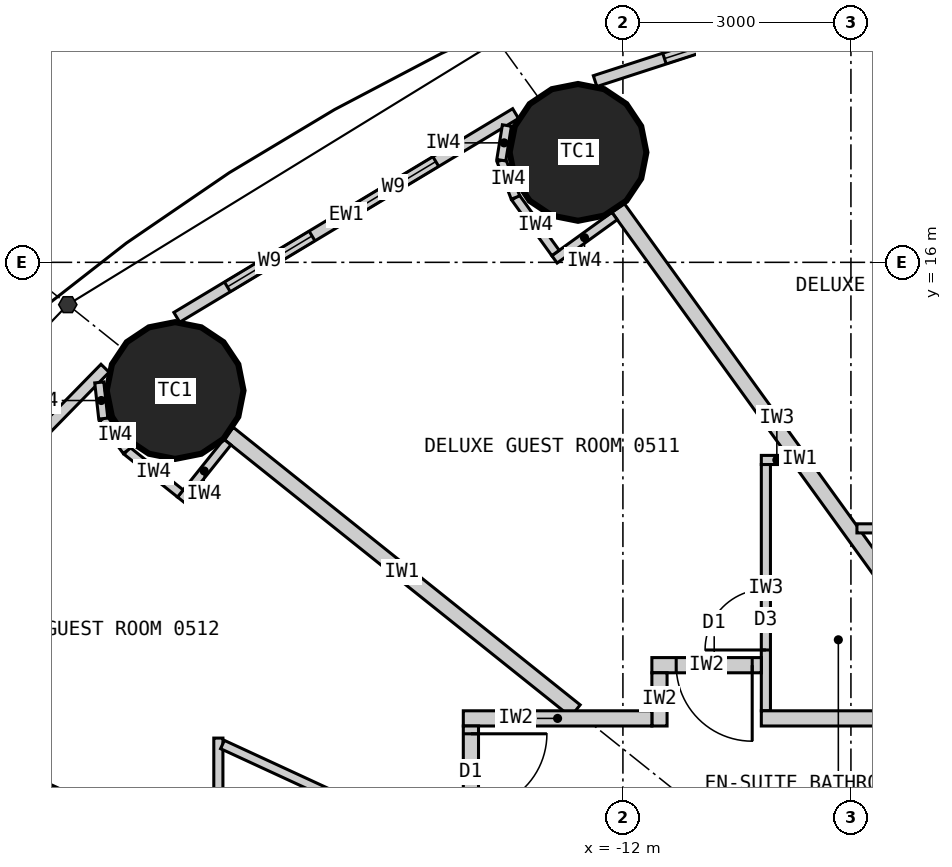
"""IFC4 building model, lengths in metres.
Left out: names, types, materials, properties, quantities, classifications, styles, units other than length and angle.
Written with IfcOpenShell. Run it as: python <this file> out.ifc"""

import sys

from ifc_helpers import new_model, si_unit, direction, frame, frame_2d, origin, origin_2d, place, context, subcontext, project, spatial, rectangle, circle, extrude, element, fill, save


model = new_model("IFC4")
c1 = context("Model", 3, precision=1e-05, world=origin(), true_north=direction((0.0, 1.0)))
c2 = subcontext(c1, "Body", "Model", "MODEL_VIEW")
j1 = project(units=[si_unit("LENGTHUNIT", "METRE"), si_unit("PLANEANGLEUNIT", "RADIAN")], contexts=[c1])
p1 = place(None, origin())
s1 = spatial("IfcSite", under=j1, at=p1, CompositionType="ELEMENT")
p2 = place(p1, origin())
s2 = spatial("IfcBuilding", under=s1, at=p2, CompositionType="ELEMENT")
p3 = place(p2, frame((0.0, 0.0, 29.4)))
s3 = spatial("IfcBuildingStorey", under=s2, at=p3, CompositionType="ELEMENT", Elevation=29.4)
for number, where, z_axis, x_axis in (
    (1, (-12.591, 17.447, 0.0), (0.0, 0.0, 1.0), (1.0, 0.0, 0.0)),
    (2, (-17.892, 14.313, 0.0), (0.0, 0.0, 1.0), (1.0, 0.0, 0.0)),
):
    element("IfcColumn", number, at=place(p3, frame(where, z_axis=z_axis, x_axis=x_axis)), inside=s3, PredefinedType="COLUMN", context=c2, shape_type="SweptSolid", body=[
        extrude(circle(Radius=0.9, at=origin_2d()), origin(), (0.0, 0.0, 1.0), 3.3),
    ])
p4 = place(p3, frame((-7.188, 20.065, 0.0), z_axis=(0.0, 0.0, 1.0), x_axis=(-0.951138486029, -0.308764603532, 0.0)))
e3 = element("IfcWall", 3, at=p4, inside=s3, PredefinedType="ELEMENTEDWALL", context=c2, shape_type="SweptSolid", body=[
    extrude(rectangle(XDim=5.444, YDim=0.15, at=frame_2d((2.722, 0.0))), origin(), (0.0, 0.0, 1.0), 3.12),
])
p5 = place(p4, frame((1.284, 0.0, 0.9)))
e4 = element("IfcOpeningElement", 4, at=p5, cuts=e3, PredefinedType="OPENING", context=c2, shape_type="SweptSolid", body=[
    extrude(rectangle(XDim=1.3, YDim=1.9, at=frame_2d((0.65, 0.95))), frame((0.0, 0.085, 0.0), z_axis=(0.0, -1.0, 0.0), x_axis=(1.0, 0.0, 0.0)), (0.0, 0.0, 1.0), 0.17),
])
p6 = place(p4, frame((3.184, 0.0, 0.9)))
e5 = element("IfcOpeningElement", 5, at=p6, cuts=e3, PredefinedType="OPENING", context=c2, shape_type="SweptSolid", body=[
    extrude(rectangle(XDim=1.3, YDim=1.9, at=frame_2d((0.65, 0.95))), frame((0.0, 0.085, 0.0), z_axis=(0.0, -1.0, 0.0), x_axis=(1.0, 0.0, 0.0)), (0.0, 0.0, 1.0), 0.17),
])
p7 = place(p3, frame((-13.412, 17.957, 0.0), z_axis=(0.0, 0.0, 1.0), x_axis=(-0.856958191554, -0.515385931054, 0.0)))
e6 = element("IfcWall", 6, at=p7, inside=s3, PredefinedType="ELEMENTEDWALL", context=c2, shape_type="SweptSolid", body=[
    extrude(rectangle(XDim=5.201, YDim=0.15, at=frame_2d((2.601, 0.0))), origin(), (0.0, 0.0, 1.0), 3.12),
])
p8 = place(p7, frame((1.225, 0.0, 0.9)))
e7 = element("IfcOpeningElement", 7, at=p8, cuts=e6, PredefinedType="OPENING", context=c2, shape_type="SweptSolid", body=[
    extrude(rectangle(XDim=1.3, YDim=1.9, at=frame_2d((0.65, 0.95))), frame((0.0, 0.085, 0.0), z_axis=(0.0, -1.0, 0.0), x_axis=(1.0, 0.0, 0.0)), (0.0, 0.0, 1.0), 0.17),
])
p9 = place(p7, frame((3.125, 0.0, 0.9)))
e8 = element("IfcOpeningElement", 8, at=p9, cuts=e6, PredefinedType="OPENING", context=c2, shape_type="SweptSolid", body=[
    extrude(rectangle(XDim=1.3, YDim=1.9, at=frame_2d((0.65, 0.95))), frame((0.0, 0.085, 0.0), z_axis=(0.0, -1.0, 0.0), x_axis=(1.0, 0.0, 0.0)), (0.0, 0.0, 1.0), 0.17),
])
p10 = place(p3, frame((-18.813, 14.607, 0.0), z_axis=(0.0, 0.0, 1.0), x_axis=(-0.699612594083, -0.714522370679, 0.0)))
e9 = element("IfcWall", 9, at=p10, inside=s3, PredefinedType="ELEMENTEDWALL", context=c2, shape_type="SweptSolid", body=[
    extrude(rectangle(XDim=4.896, YDim=0.15, at=frame_2d((2.448, 0.0))), origin(), (0.0, 0.0, 1.0), 3.12),
])
p11 = place(p10, frame((1.077, 0.0, 0.9)))
e10 = element("IfcOpeningElement", 10, at=p11, cuts=e9, PredefinedType="OPENING", context=c2, shape_type="SweptSolid", body=[
    extrude(rectangle(XDim=1.3, YDim=1.9, at=frame_2d((0.65, 0.95))), frame((0.0, 0.085, 0.0), z_axis=(0.0, -1.0, 0.0), x_axis=(1.0, 0.0, 0.0)), (0.0, 0.0, 1.0), 0.17),
])
p12 = place(p10, frame((2.977, 0.0, 0.9)))
e11 = element("IfcOpeningElement", 11, at=p12, cuts=e9, PredefinedType="OPENING", context=c2, shape_type="SweptSolid", body=[
    extrude(rectangle(XDim=1.3, YDim=1.9, at=frame_2d((0.65, 0.95))), frame((0.0, 0.085, 0.0), z_axis=(0.0, -1.0, 0.0), x_axis=(1.0, 0.0, 0.0)), (0.0, 0.0, 1.0), 0.17),
])
p13 = place(p3, frame((-7.289, 10.1, 0.0), z_axis=(0.0, 0.0, 1.0), x_axis=(-0.585216319319, 0.810877216108, 0.0)))
e12 = element("IfcWall", 12, at=p13, inside=s3, PredefinedType="PARTITIONING", context=c2, shape_type="SweptSolid", body=[
    extrude(rectangle(XDim=8.16, YDim=0.2, at=frame_2d((4.08, 0.0))), origin(), (0.0, 0.0, 1.0), 2.32),
])
p14 = place(p3, frame((-12.625, 10.1, 0.0), z_axis=(0.0, 0.0, 1.0), x_axis=(-0.780872884676, 0.624689953479, 0.0)))
e13 = element("IfcWall", 13, at=p14, inside=s3, PredefinedType="PARTITIONING", context=c2, shape_type="SweptSolid", body=[
    extrude(rectangle(XDim=5.845, YDim=0.2, at=frame_2d((2.922, 0.0))), origin(), (0.0, 0.0, 1.0), 2.32),
])
p15 = place(p3, frame((-14.1, 6.512, 0.0), z_axis=(0.0, 0.0, 1.0), x_axis=(-0.907842433118, 0.41931147925, 0.0)))
e14 = element("IfcWall", 14, at=p15, inside=s3, PredefinedType="PARTITIONING", context=c2, shape_type="SweptSolid", body=[
    extrude(rectangle(XDim=7.823, YDim=0.2, at=frame_2d((3.912, 0.0))), origin(), (0.0, 0.0, 1.0), 2.32),
])
p16 = place(p3, frame((-8.921, 12.5, 0.0), z_axis=(0.0, 0.0, 1.0), x_axis=(1.0, 0.0, 0.0)))
e15 = element("IfcWall", 15, at=p16, inside=s3, PredefinedType="PARTITIONING", context=c2, shape_type="SweptSolid", body=[
    extrude(rectangle(XDim=3.372, YDim=0.12, at=frame_2d((1.686, 0.0))), origin(), (0.0, 0.0, 1.0), 3.12),
])
p17 = place(p3, frame((-9.771, 13.4, 0.0), z_axis=(0.0, 0.0, 1.0), x_axis=(-1.0, 0.0, 0.0)))
e16 = element("IfcWall", 16, at=p17, inside=s3, PredefinedType="PARTITIONING", context=c2, shape_type="SweptSolid", body=[
    extrude(rectangle(XDim=0.408, YDim=0.12, at=frame_2d((0.204, 0.0))), origin(), (0.0, 0.0, 1.0), 3.12),
])
p18 = place(p3, frame((-10.119, 10.1, 0.0), z_axis=(0.0, 0.0, 1.0), x_axis=(0.0, 1.0, 0.0)))
e17 = element("IfcWall", 17, at=p18, inside=s3, PredefinedType="PARTITIONING", context=c2, shape_type="SweptSolid", body=[
    extrude(rectangle(XDim=3.24, YDim=0.12, at=frame_2d((1.62, 0.0))), origin(), (0.0, 0.0, 1.0), 3.12),
])
p19 = place(p18, frame((0.8, 0.0, 0.0)))
e18 = element("IfcOpeningElement", 18, at=p19, cuts=e17, PredefinedType="OPENING", context=c2, shape_type="SweptSolid", body=[
    extrude(rectangle(XDim=0.8, YDim=2.1, at=frame_2d((0.4, 1.05))), frame((0.0, 0.07, 0.0), z_axis=(0.0, -1.0, 0.0), x_axis=(1.0, 0.0, 0.0)), (0.0, 0.0, 1.0), 0.14),
])
p20 = place(p3, frame((-17.323, 8.101, 0.0), z_axis=(0.0, 0.0, 1.0), x_axis=(0.0, 1.0, 0.0)))
e19 = element("IfcWall", 19, at=p20, inside=s3, PredefinedType="PARTITIONING", context=c2, shape_type="SweptSolid", body=[
    extrude(rectangle(XDim=1.64, YDim=0.12, at=frame_2d((0.82, 0.0))), origin(), (0.0, 0.0, 1.0), 3.12),
])
p21 = place(p3, frame((-14.1, 8.193, 0.0), z_axis=(0.0, 0.0, 1.0), x_axis=(-0.907836493557, 0.419324338628, 0.0)))
e20 = element("IfcWall", 20, at=p21, inside=s3, PredefinedType="PARTITIONING", context=c2, shape_type="SweptSolid", body=[
    extrude(rectangle(XDim=3.49, YDim=0.12, at=frame_2d((1.745, 0.0))), origin(), (0.0, 0.0, 1.0), 3.12),
])
p22 = place(p21, frame((0.75, 0.0, 0.0)))
e21 = element("IfcOpeningElement", 21, at=p22, cuts=e20, PredefinedType="OPENING", context=c2, shape_type="SweptSolid", body=[
    extrude(rectangle(XDim=0.8, YDim=2.1, at=frame_2d((0.4, 1.05))), frame((0.0, 0.07, 0.0), z_axis=(0.0, -1.0, 0.0), x_axis=(1.0, 0.0, 0.0)), (0.0, 0.0, 1.0), 0.14),
])
p23 = place(p3, frame((-11.619, 10.7, 0.0), z_axis=(0.0, 0.0, 1.0), x_axis=(1.0, 0.0, 0.0)))
e22 = element("IfcWall", 22, at=p23, inside=s3, PredefinedType="PARTITIONING", context=c2, shape_type="SweptSolid", body=[
    extrude(rectangle(XDim=1.44, YDim=0.2, at=frame_2d((0.72, 0.0))), origin(), (0.0, 0.0, 1.0), 3.12),
])
p24 = place(p23, frame((0.32, 0.0, 0.0)))
e23 = element("IfcOpeningElement", 23, at=p24, cuts=e22, PredefinedType="OPENING", context=c2, shape_type="SweptSolid", body=[
    extrude(rectangle(XDim=1.0, YDim=2.2, at=frame_2d((0.5, 1.1))), frame((0.0, 0.11, 0.0), z_axis=(0.0, -1.0, 0.0), x_axis=(1.0, 0.0, 0.0)), (0.0, 0.0, 1.0), 0.22),
])
p25 = place(p3, frame((-11.519, 9.9, 0.0), z_axis=(0.0, 0.0, 1.0), x_axis=(0.0, 1.0, 0.0)))
e24 = element("IfcWall", 24, at=p25, inside=s3, PredefinedType="PARTITIONING", context=c2, shape_type="SweptSolid", body=[
    extrude(rectangle(XDim=0.7, YDim=0.2, at=frame_2d((0.35, 0.0))), origin(), (0.0, 0.0, 1.0), 3.12),
])
p26 = place(p3, frame((-14.1, 10.0, 0.0), z_axis=(0.0, 0.0, 1.0), x_axis=(1.0, 0.0, 0.0)))
e25 = element("IfcWall", 25, at=p26, inside=s3, PredefinedType="PARTITIONING", context=c2, shape_type="SweptSolid", body=[
    extrude(rectangle(XDim=2.481, YDim=0.2, at=frame_2d((1.24, 0.0))), origin(), (0.0, 0.0, 1.0), 3.12),
])
p27 = place(p3, frame((-10.179, 10.0, 0.0), z_axis=(0.0, 0.0, 1.0), x_axis=(1.0, 0.0, 0.0)))
e26 = element("IfcWall", 26, at=p27, inside=s3, PredefinedType="PARTITIONING", context=c2, shape_type="SweptSolid", body=[
    extrude(rectangle(XDim=4.63, YDim=0.2, at=frame_2d((2.315, 0.0))), origin(), (0.0, 0.0, 1.0), 3.12),
])
p28 = place(p3, frame((-14.0, 9.9, 0.0), z_axis=(0.0, 0.0, 1.0), x_axis=(0.0, -1.0, 0.0)))
e27 = element("IfcWall", 27, at=p28, inside=s3, PredefinedType="PARTITIONING", context=c2, shape_type="SweptSolid", body=[
    extrude(rectangle(XDim=5.127, YDim=0.2, at=frame_2d((2.564, 0.0))), origin(), (0.0, 0.0, 1.0), 3.12),
])
p29 = place(p28, frame((0.103, 0.0, 0.0)))
e28 = element("IfcOpeningElement", 28, at=p29, cuts=e27, PredefinedType="OPENING", context=c2, shape_type="SweptSolid", body=[
    extrude(rectangle(XDim=1.0, YDim=2.2, at=frame_2d((0.5, 1.1))), frame((0.0, 0.11, 0.0), z_axis=(0.0, -1.0, 0.0), x_axis=(1.0, 0.0, 0.0)), (0.0, 0.0, 1.0), 0.22),
])
p30 = place(p3, frame((-12.11, 16.609, 0.0), z_axis=(0.0, 0.0, 1.0), x_axis=(-0.810897160646, -0.585188683123, 0.0)))
e29 = element("IfcWall", 29, at=p30, inside=s3, PredefinedType="PARTITIONING", context=c2, shape_type="SweptSolid", body=[
    extrude(rectangle(XDim=0.975, YDim=0.12, at=frame_2d((0.487, 0.0))), origin(), (0.0, 0.0, 1.0), 3.12),
])
p31 = place(p3, frame((-12.887, 16.123, 0.0), z_axis=(0.0, 0.0, 1.0), x_axis=(-0.585054732094, 0.810993810367, 0.0)))
e30 = element("IfcWall", 30, at=p31, inside=s3, PredefinedType="PARTITIONING", context=c2, shape_type="SweptSolid", body=[
    extrude(rectangle(XDim=0.9, YDim=0.12, at=frame_2d((0.45, 0.0))), origin(), (0.0, 0.0, 1.0), 3.12),
])
p32 = place(p3, frame((-13.414, 16.853, 0.0), z_axis=(0.0, 0.0, 1.0), x_axis=(-0.355705277023, 0.934598178844, 0.0)))
e31 = element("IfcWall", 31, at=p32, inside=s3, PredefinedType="PARTITIONING", context=c2, shape_type="SweptSolid", body=[
    extrude(rectangle(XDim=0.525, YDim=0.12, at=frame_2d((0.263, 0.0))), origin(), (0.0, 0.0, 1.0), 3.12),
])
p33 = place(p3, frame((-13.6, 17.344, 0.0), z_axis=(0.0, 0.0, 1.0), x_axis=(0.15994604532, 0.987125758243, 0.0)))
e32 = element("IfcWall", 32, at=p33, inside=s3, PredefinedType="PARTITIONING", context=c2, shape_type="SweptSolid", body=[
    extrude(rectangle(XDim=0.462, YDim=0.12, at=frame_2d((0.231, 0.0))), origin(), (0.0, 0.0, 1.0), 3.12),
])
p34 = place(p3, frame((-17.205, 13.635, 0.0), z_axis=(0.0, 0.0, 1.0), x_axis=(-0.624756144097, -0.780819928289, 0.0)))
e33 = element("IfcWall", 33, at=p34, inside=s3, PredefinedType="PARTITIONING", context=c2, shape_type="SweptSolid", body=[
    extrude(rectangle(XDim=0.975, YDim=0.12, at=frame_2d((0.487, 0.0))), origin(), (0.0, 0.0, 1.0), 3.12),
])
p35 = place(p3, frame((-17.823, 12.959, 0.0), z_axis=(0.0, 0.0, 1.0), x_axis=(-0.780895271023, 0.624661969144, 0.0)))
e34 = element("IfcWall", 34, at=p35, inside=s3, PredefinedType="PARTITIONING", context=c2, shape_type="SweptSolid", body=[
    extrude(rectangle(XDim=0.9, YDim=0.12, at=frame_2d((0.45, 0.0))), origin(), (0.0, 0.0, 1.0), 3.12),
])
p36 = place(p3, frame((-18.526, 13.521, 0.0), z_axis=(0.0, 0.0, 1.0), x_axis=(-0.592532503205, 0.805546542818, 0.0)))
e35 = element("IfcWall", 35, at=p36, inside=s3, PredefinedType="PARTITIONING", context=c2, shape_type="SweptSolid", body=[
    extrude(rectangle(XDim=0.525, YDim=0.12, at=frame_2d((0.262, 0.0))), origin(), (0.0, 0.0, 1.0), 3.12),
])
p37 = place(p3, frame((-18.837, 13.944, 0.0), z_axis=(0.0, 0.0, 1.0), x_axis=(-0.110543348478, 0.993871303594, 0.0)))
e36 = element("IfcWall", 36, at=p37, inside=s3, PredefinedType="PARTITIONING", context=c2, shape_type="SweptSolid", body=[
    extrude(rectangle(XDim=0.479, YDim=0.12, at=frame_2d((0.24, 0.0))), origin(), (0.0, 0.0, 1.0), 3.12),
])
p38 = place(p6, origin())
e37 = element("IfcWindow", 37, at=p38, inside=s3, PartitioningType="SINGLE_PANEL", PredefinedType="WINDOW", context=c2, shape_type="SweptSolid", body=[
    extrude(rectangle(XDim=1.3, YDim=1.9, at=frame_2d((0.65, 0.95))), frame((0.0, 0.03, 0.0), z_axis=(0.0, -1.0, 0.0), x_axis=(1.0, 0.0, 0.0)), (0.0, 0.0, 1.0), 0.06),
])
fill(e5, e37)
p39 = place(p8, origin())
e38 = element("IfcWindow", 38, at=p39, inside=s3, PartitioningType="SINGLE_PANEL", PredefinedType="WINDOW", context=c2, shape_type="SweptSolid", body=[
    extrude(rectangle(XDim=1.3, YDim=1.9, at=frame_2d((0.65, 0.95))), frame((0.0, 0.03, 0.0), z_axis=(0.0, -1.0, 0.0), x_axis=(1.0, 0.0, 0.0)), (0.0, 0.0, 1.0), 0.06),
])
fill(e7, e38)
p40 = place(p9, origin())
e39 = element("IfcWindow", 39, at=p40, inside=s3, PartitioningType="SINGLE_PANEL", PredefinedType="WINDOW", context=c2, shape_type="SweptSolid", body=[
    extrude(rectangle(XDim=1.3, YDim=1.9, at=frame_2d((0.65, 0.95))), frame((0.0, 0.03, 0.0), z_axis=(0.0, -1.0, 0.0), x_axis=(1.0, 0.0, 0.0)), (0.0, 0.0, 1.0), 0.06),
])
fill(e8, e39)
p41 = place(p19, origin())
e40 = element("IfcDoor", 40, at=p41, inside=s3, OperationType="SINGLE_SWING_LEFT", PredefinedType="DOOR", context=c2, shape_type="SweptSolid", body=[
    extrude(rectangle(XDim=0.8, YDim=2.1, at=frame_2d((0.4, 1.05))), frame((0.0, 0.025, 0.0), z_axis=(0.0, -1.0, 0.0), x_axis=(1.0, 0.0, 0.0)), (0.0, 0.0, 1.0), 0.05),
])
fill(e18, e40)
p42 = place(p24, origin())
e41 = element("IfcDoor", 41, at=p42, inside=s3, OperationType="SINGLE_SWING_RIGHT", PredefinedType="DOOR", context=c2, shape_type="SweptSolid", body=[
    extrude(rectangle(XDim=1.0, YDim=2.2, at=frame_2d((0.5, 1.1))), frame((0.0, 0.025, 0.0), z_axis=(0.0, -1.0, 0.0), x_axis=(1.0, 0.0, 0.0)), (0.0, 0.0, 1.0), 0.05),
])
fill(e23, e41)
p43 = place(p29, origin())
e42 = element("IfcDoor", 42, at=p43, inside=s3, OperationType="SINGLE_SWING_LEFT", PredefinedType="DOOR", context=c2, shape_type="SweptSolid", body=[
    extrude(rectangle(XDim=1.0, YDim=2.2, at=frame_2d((0.5, 1.1))), frame((0.0, 0.025, 0.0), z_axis=(0.0, -1.0, 0.0), x_axis=(1.0, 0.0, 0.0)), (0.0, 0.0, 1.0), 0.05),
])
fill(e28, e42)
save(model, sys.argv[1])
